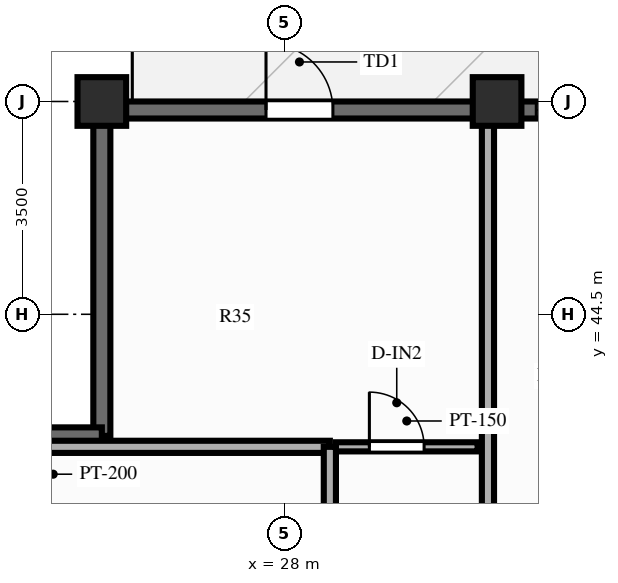
"""IFC4 building model, lengths in metres.
Left out: names, types, materials, properties, quantities, classifications, styles, units other than length and angle.
Written with IfcOpenShell. Run it as: python <this file> out.ifc"""

import sys

from ifc_helpers import new_model, si_unit, direction, frame, frame_2d, origin, origin_2d, place, context, subcontext, project, spatial, rectangle, extrude, source, transform, mapped, element, fill, save


model = new_model("IFC4")
c1 = context("Model", 3, precision=1e-05, world=origin(), true_north=direction((0.0, 1.0)))
c2 = subcontext(c1, "Body", "Model", "MODEL_VIEW")
j1 = project(units=[si_unit("LENGTHUNIT", "METRE"), si_unit("PLANEANGLEUNIT", "RADIAN")], contexts=[c1])
p1 = place(None, origin())
s1 = spatial("IfcSite", under=j1, at=p1, CompositionType="ELEMENT")
p2 = place(p1, origin())
s2 = spatial("IfcBuilding", under=s1, at=p2, CompositionType="ELEMENT")
p3 = place(p2, frame((0.0, 0.0, 199.6)))
s3 = spatial("IfcBuildingStorey", under=s2, at=p3, CompositionType="ELEMENT", Elevation=199.6)
m1 = source(origin(), c2, "Body", "SweptSolid", [
    extrude(rectangle(XDim=0.8, YDim=0.8, at=origin_2d()), origin(), (0.0, 0.0, 1.0), 3.0),
])
for number, where, z_axis, x_axis in (
    (1, (31.5, 48.0, 0.0), (0.0, 0.0, 1.0), (1.0, 0.0, 0.0)),
    (2, (25.0, 48.0, 0.0), (0.0, 0.0, 1.0), (1.0, 0.0, 0.0)),
):
    element("IfcColumn", number, at=place(p3, frame(where, z_axis=z_axis, x_axis=x_axis)), inside=s3, PredefinedType="COLUMN", context=c2, shape_type="MappedRepresentation", body=[
        mapped(m1, transform((0.0, 0.0, 0.0), scale=1.0)),
    ])
p4 = place(p3, frame((25.0, 47.86, 0.0), z_axis=(0.0, 0.0, 1.0), x_axis=(1.0, 0.0, 0.0)))
e3 = element("IfcWall", 3, at=p4, inside=s3, PredefinedType="SOLIDWALL", context=c2, shape_type="SweptSolid", body=[
    extrude(rectangle(XDim=26.0, YDim=0.28, at=frame_2d((13.0, 0.0))), origin(), (0.0, 0.0, 1.0), 2.28),
])
p5 = place(p4, frame((2.7, 0.0, 0.0)))
e4 = element("IfcOpeningElement", 4, at=p5, cuts=e3, PredefinedType="OPENING", context=c2, shape_type="SweptSolid", body=[
    extrude(rectangle(XDim=1.1, YDim=2.15, at=frame_2d((0.55, 1.075))), frame((0.0, 0.152, 0.0), z_axis=(0.0, -1.0, 0.0), x_axis=(1.0, 0.0, 0.0)), (0.0, 0.0, 1.0), 0.304),
])
p6 = place(p4, frame((7.145, 0.0, 0.25)))
e5 = element("IfcOpeningElement", 5, at=p6, cuts=e3, PredefinedType="OPENING", context=c2, shape_type="SweptSolid", body=[
    extrude(rectangle(XDim=0.95, YDim=1.5, at=frame_2d((0.475, 0.75))), frame((0.0, 0.152, 0.0), z_axis=(0.0, -1.0, 0.0), x_axis=(1.0, 0.0, 0.0)), (0.0, 0.0, 1.0), 0.304),
])
p7 = place(p4, frame((9.182, 0.0, 0.25)))
e6 = element("IfcOpeningElement", 6, at=p7, cuts=e3, PredefinedType="OPENING", context=c2, shape_type="SweptSolid", body=[
    extrude(rectangle(XDim=1.2, YDim=1.5, at=frame_2d((0.6, 0.75))), frame((0.0, 0.152, 0.0), z_axis=(0.0, -1.0, 0.0), x_axis=(1.0, 0.0, 0.0)), (0.0, 0.0, 1.0), 0.304),
])
p8 = place(p4, frame((11.97, 0.0, 0.25)))
e7 = element("IfcOpeningElement", 7, at=p8, cuts=e3, PredefinedType="OPENING", context=c2, shape_type="SweptSolid", body=[
    extrude(rectangle(XDim=1.2, YDim=1.5, at=frame_2d((0.6, 0.75))), frame((0.0, 0.152, 0.0), z_axis=(0.0, -1.0, 0.0), x_axis=(1.0, 0.0, 0.0)), (0.0, 0.0, 1.0), 0.304),
])
p9 = place(p4, frame((14.98, 0.0, 0.25)))
e8 = element("IfcOpeningElement", 8, at=p9, cuts=e3, PredefinedType="OPENING", context=c2, shape_type="SweptSolid", body=[
    extrude(rectangle(XDim=1.2, YDim=1.5, at=frame_2d((0.6, 0.75))), frame((0.0, 0.152, 0.0), z_axis=(0.0, -1.0, 0.0), x_axis=(1.0, 0.0, 0.0)), (0.0, 0.0, 1.0), 0.304),
])
p10 = place(p4, frame((17.573, 0.0, 0.25)))
e9 = element("IfcOpeningElement", 9, at=p10, cuts=e3, PredefinedType="OPENING", context=c2, shape_type="SweptSolid", body=[
    extrude(rectangle(XDim=1.2, YDim=1.5, at=frame_2d((0.6, 0.75))), frame((0.0, 0.152, 0.0), z_axis=(0.0, -1.0, 0.0), x_axis=(1.0, 0.0, 0.0)), (0.0, 0.0, 1.0), 0.304),
])
p11 = place(p4, frame((22.15, 0.0, 0.25)))
e10 = element("IfcOpeningElement", 10, at=p11, cuts=e3, PredefinedType="OPENING", context=c2, shape_type="SweptSolid", body=[
    extrude(rectangle(XDim=1.2, YDim=1.5, at=frame_2d((0.6, 0.75))), frame((0.0, 0.152, 0.0), z_axis=(0.0, -1.0, 0.0), x_axis=(1.0, 0.0, 0.0)), (0.0, 0.0, 1.0), 0.304),
])
for number, where, z_axis, x_axis in (
    (11, (25.0, 42.5, 0.0), (0.0, 0.0, 1.0), (0.0, 1.0, 0.0)),
    (12, (19.58, 42.5, 0.0), (0.0, 0.0, 1.0), (1.0, 0.0, 0.0)),
):
    element("IfcWall", number, at=place(p3, frame(where, z_axis=z_axis, x_axis=x_axis)), inside=s3, PredefinedType="SOLIDWALL", context=c2, shape_type="SweptSolid", body=[
        extrude(rectangle(XDim=5.42, YDim=0.28, at=frame_2d((2.71, 0.0))), origin(), (0.0, 0.0, 1.0), 2.28),
    ])
p12 = place(p3, frame((28.85, 42.32, 0.0), z_axis=(0.0, 0.0, 1.0), x_axis=(1.0, 0.0, 0.0)))
e13 = element("IfcWall", 13, at=p12, inside=s3, PredefinedType="PARTITIONING", context=c2, shape_type="SweptSolid", body=[
    extrude(rectangle(XDim=2.33, YDim=0.15, at=frame_2d((1.165, 0.0))), origin(), (0.0, 0.0, 1.0), 2.79),
])
p13 = place(p12, frame((0.55, 0.0, 0.0)))
e14 = element("IfcOpeningElement", 14, at=p13, cuts=e13, PredefinedType="OPENING", context=c2, shape_type="SweptSolid", body=[
    extrude(rectangle(XDim=0.9, YDim=2.1, at=frame_2d((0.45, 1.05))), frame((0.0, 0.087, 0.0), z_axis=(0.0, -1.0, 0.0), x_axis=(1.0, 0.0, 0.0)), (0.0, 0.0, 1.0), 0.174),
])
p14 = place(p3, frame((31.35, 39.05, 0.0), z_axis=(0.0, 0.0, 1.0), x_axis=(0.0, 1.0, 0.0)))
e15 = element("IfcWall", 15, at=p14, inside=s3, PredefinedType="PARTITIONING", context=c2, shape_type="SweptSolid", body=[
    extrude(rectangle(XDim=8.8, YDim=0.2, at=frame_2d((4.4, 0.0))), origin(), (0.0, 0.0, 1.0), 2.39),
])
p15 = place(p3, frame((28.75, 42.32, 0.0), z_axis=(0.0, 0.0, 1.0), x_axis=(-1.0, 0.0, 0.0)))
e16 = element("IfcWall", 16, at=p15, inside=s3, PredefinedType="PARTITIONING", context=c2, shape_type="SweptSolid", body=[
    extrude(rectangle(XDim=9.1, YDim=0.2, at=frame_2d((4.55, 0.0))), origin(), (0.0, 0.0, 1.0), 2.79),
])
p16 = place(p3, frame((28.75, 38.429, 0.0), z_axis=(0.0, 0.0, 1.0), x_axis=(0.0, 1.0, 0.0)))
e17 = element("IfcWall", 17, at=p16, inside=s3, PredefinedType="PARTITIONING", context=c2, shape_type="SweptSolid", body=[
    extrude(rectangle(XDim=3.891, YDim=0.2, at=frame_2d((1.945, 0.0))), origin(), (0.0, 0.0, 1.0), 2.79),
])
p17 = place(p16, frame((1.445, 0.0, 0.0)))
e18 = element("IfcOpeningElement", 18, at=p17, cuts=e17, PredefinedType="OPENING", context=c2, shape_type="SweptSolid", body=[
    extrude(rectangle(XDim=1.0, YDim=2.15, at=frame_2d((0.5, 1.075))), frame((0.0, 0.112, 0.0), z_axis=(0.0, -1.0, 0.0), x_axis=(1.0, 0.0, 0.0)), (0.0, 0.0, 1.0), 0.224),
])
m2 = source(origin(), c2, "Body", "SweptSolid", [
    extrude(rectangle(XDim=1.1, YDim=2.15, at=frame_2d((0.55, 1.075))), frame((0.0, 0.025, 0.0), z_axis=(0.0, -1.0, 0.0), x_axis=(1.0, 0.0, 0.0)), (0.0, 0.0, 1.0), 0.05),
])
p18 = place(p5, origin())
e19 = element("IfcDoor", 19, at=p18, inside=s3, OperationType="SINGLE_SWING_LEFT", PredefinedType="DOOR", context=c2, shape_type="MappedRepresentation", body=[
    mapped(m2, transform((0.0, 0.0, 0.0), scale=1.0)),
])
fill(e4, e19)
m3 = source(origin(), c2, "Body", "SweptSolid", [
    extrude(rectangle(XDim=0.95, YDim=1.5, at=frame_2d((0.475, 0.75))), frame((0.0, 0.03, 0.0), z_axis=(0.0, -1.0, 0.0), x_axis=(1.0, 0.0, 0.0)), (0.0, 0.0, 1.0), 0.06),
])
p19 = place(p6, origin())
e20 = element("IfcWindow", 20, at=p19, inside=s3, PartitioningType="SINGLE_PANEL", PredefinedType="WINDOW", context=c2, shape_type="MappedRepresentation", body=[
    mapped(m3, transform((0.0, 0.0, 0.0), scale=1.0)),
])
fill(e5, e20)
m4 = source(origin(), c2, "Body", "SweptSolid", [
    extrude(rectangle(XDim=0.9, YDim=2.1, at=frame_2d((0.45, 1.05))), frame((0.0, 0.025, 0.0), z_axis=(0.0, -1.0, 0.0), x_axis=(1.0, 0.0, 0.0)), (0.0, 0.0, 1.0), 0.05),
])
p20 = place(p13, origin())
e21 = element("IfcDoor", 21, at=p20, inside=s3, OperationType="SINGLE_SWING_LEFT", PredefinedType="DOOR", context=c2, shape_type="MappedRepresentation", body=[
    mapped(m4, transform((0.0, 0.0, 0.0), scale=1.0)),
])
fill(e14, e21)
save(model, sys.argv[1])
